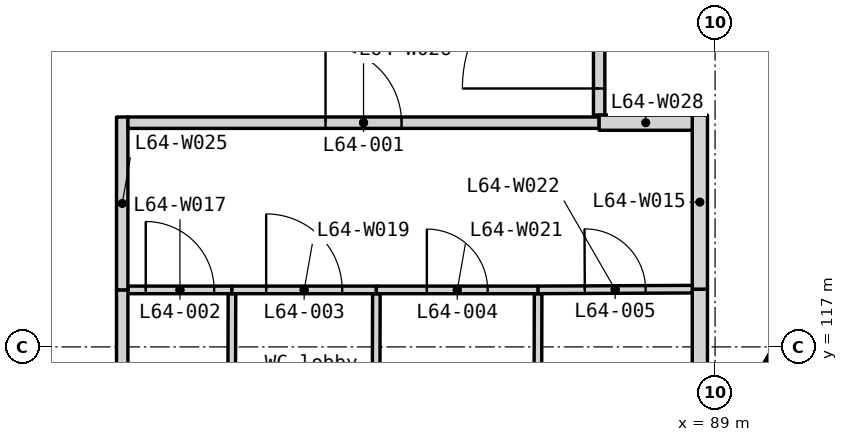
"""IFC4 building model, lengths in metres.
Left out: names, types, materials, properties, quantities, classifications, styles, units other than length and angle.
Written with IfcOpenShell. Run it as: python <this file> out.ifc"""

import sys

from ifc_helpers import new_model, si_unit, direction, frame, frame_2d, origin, place, context, subcontext, project, spatial, polyline, rectangle, outline, extrude, element, fill, save


model = new_model("IFC4")
c1 = context("Model", 3, precision=1e-05, world=origin(), true_north=direction((0.0, 1.0)))
c2 = subcontext(c1, "Body", "Model", "MODEL_VIEW")
j1 = project(units=[si_unit("LENGTHUNIT", "METRE"), si_unit("PLANEANGLEUNIT", "RADIAN")], contexts=[c1])
p1 = place(None, origin())
s1 = spatial("IfcSite", under=j1, at=p1, CompositionType="ELEMENT")
p2 = place(p1, origin())
s2 = spatial("IfcBuilding", under=s1, at=p2, CompositionType="ELEMENT")
p3 = place(p2, frame((0.0, 0.0, 262.1)))
s3 = spatial("IfcBuildingStorey", under=s2, at=p3, CompositionType="ELEMENT", Elevation=262.1)
p4 = place(p3, frame((80.905, 101.188, -0.15), z_axis=(0.0, 0.0, 1.0), x_axis=(0.500002536638, 0.866023939251, 0.0)))
e1 = element("IfcWall", 1, at=p4, inside=s3, PredefinedType="SOLIDWALL", context=c2, shape_type="SweptSolid", body=[
    extrude(outline(polyline([(36.972, 0.0), (36.972, 3.9), (0.0, 3.9), (0.0, 0.0), (36.972, 0.0)])), frame((0.0, 0.225, 0.0), z_axis=(0.0, -1.0, 0.0), x_axis=(1.0, 0.0, 0.0)), (0.0, 0.0, 1.0), 0.45),
])
p5 = place(p4, frame((0.744, 0.0, 0.95)))
e2 = element("IfcOpeningElement", 2, at=p5, cuts=e1, PredefinedType="OPENING", context=c2, shape_type="SweptSolid", body=[
    extrude(rectangle(XDim=1.2, YDim=2.2, at=frame_2d((0.6, 1.1))), frame((0.0, 0.235, 0.0), z_axis=(0.0, -1.0, 0.0), x_axis=(1.0, 0.0, 0.0)), (0.0, 0.0, 1.0), 0.47),
])
p6 = place(p4, frame((7.793, 0.0, 0.95)))
e3 = element("IfcOpeningElement", 3, at=p6, cuts=e1, PredefinedType="OPENING", context=c2, shape_type="SweptSolid", body=[
    extrude(rectangle(XDim=1.2, YDim=2.2, at=frame_2d((0.6, 1.1))), frame((0.0, 0.235, 0.0), z_axis=(0.0, -1.0, 0.0), x_axis=(1.0, 0.0, 0.0)), (0.0, 0.0, 1.0), 0.47),
])
p7 = place(p4, frame((9.493, 0.0, 0.95)))
e4 = element("IfcOpeningElement", 4, at=p7, cuts=e1, PredefinedType="OPENING", context=c2, shape_type="SweptSolid", body=[
    extrude(rectangle(XDim=1.2, YDim=2.2, at=frame_2d((0.6, 1.1))), frame((0.0, 0.235, 0.0), z_axis=(0.0, -1.0, 0.0), x_axis=(1.0, 0.0, 0.0)), (0.0, 0.0, 1.0), 0.47),
])
p8 = place(p4, frame((17.036, 0.0, 0.95)))
e5 = element("IfcOpeningElement", 5, at=p8, cuts=e1, PredefinedType="OPENING", context=c2, shape_type="SweptSolid", body=[
    extrude(rectangle(XDim=1.2, YDim=2.2, at=frame_2d((0.6, 1.1))), frame((0.0, 0.235, 0.0), z_axis=(0.0, -1.0, 0.0), x_axis=(1.0, 0.0, 0.0)), (0.0, 0.0, 1.0), 0.47),
])
p9 = place(p4, frame((18.736, 0.0, 0.95)))
e6 = element("IfcOpeningElement", 6, at=p9, cuts=e1, PredefinedType="OPENING", context=c2, shape_type="SweptSolid", body=[
    extrude(rectangle(XDim=1.2, YDim=2.2, at=frame_2d((0.6, 1.1))), frame((0.0, 0.235, 0.0), z_axis=(0.0, -1.0, 0.0), x_axis=(1.0, 0.0, 0.0)), (0.0, 0.0, 1.0), 0.47),
])
p10 = place(p4, frame((26.279, 0.0, 0.95)))
e7 = element("IfcOpeningElement", 7, at=p10, cuts=e1, PredefinedType="OPENING", context=c2, shape_type="SweptSolid", body=[
    extrude(rectangle(XDim=1.2, YDim=2.2, at=frame_2d((0.6, 1.1))), frame((0.0, 0.235, 0.0), z_axis=(0.0, -1.0, 0.0), x_axis=(1.0, 0.0, 0.0)), (0.0, 0.0, 1.0), 0.47),
])
p11 = place(p4, frame((27.979, 0.0, 0.95)))
e8 = element("IfcOpeningElement", 8, at=p11, cuts=e1, PredefinedType="OPENING", context=c2, shape_type="SweptSolid", body=[
    extrude(rectangle(XDim=1.2, YDim=2.2, at=frame_2d((0.6, 1.1))), frame((0.0, 0.235, 0.0), z_axis=(0.0, -1.0, 0.0), x_axis=(1.0, 0.0, 0.0)), (0.0, 0.0, 1.0), 0.47),
])
p12 = place(p4, frame((35.028, 0.0, 0.95)))
e9 = element("IfcOpeningElement", 9, at=p12, cuts=e1, PredefinedType="OPENING", context=c2, shape_type="SweptSolid", body=[
    extrude(rectangle(XDim=1.2, YDim=2.2, at=frame_2d((0.6, 1.1))), frame((0.0, 0.235, 0.0), z_axis=(0.0, -1.0, 0.0), x_axis=(1.0, 0.0, 0.0)), (0.0, 0.0, 1.0), 0.47),
])
p13 = place(p3, frame((88.8, 115.312, 0.0), z_axis=(0.0, 0.0, 1.0), x_axis=(0.0, 1.0, 0.0)))
e10 = element("IfcWall", 10, at=p13, inside=s3, PredefinedType="PARTITIONING", context=c2, shape_type="SweptSolid", body=[
    extrude(rectangle(XDim=2.448, YDim=0.2, at=frame_2d((1.224, 0.0))), origin(), (0.0, 0.0, 1.0), 3.062),
])
p14 = place(p3, frame((88.8, 117.76, 0.0), z_axis=(0.0, 0.0, 1.0), x_axis=(0.0, 1.0, 0.0)))
e11 = element("IfcWall", 11, at=p14, inside=s3, PredefinedType="PARTITIONING", context=c2, shape_type="SweptSolid", body=[
    extrude(rectangle(XDim=2.29, YDim=0.2, at=frame_2d((1.145, 0.0))), origin(), (0.0, 0.0, 1.0), 3.062),
])
p15 = place(p3, frame((82.634, 114.05, 0.0), z_axis=(0.0, 0.0, 1.0), x_axis=(0.002608686776, 0.999996597371, 0.0)))
e12 = element("IfcWall", 12, at=p15, inside=s3, PredefinedType="PARTITIONING", context=c2, shape_type="SweptSolid", body=[
    extrude(rectangle(XDim=3.65, YDim=0.1, at=frame_2d((1.825, 0.0))), origin(), (0.0, 0.0, 1.0), 3.75),
])
p16 = place(p3, frame((81.275, 117.75, 0.0), z_axis=(0.0, 0.0, 1.0), x_axis=(1.0, 0.0, 0.0)))
e13 = element("IfcWall", 13, at=p16, inside=s3, PredefinedType="PARTITIONING", context=c2, shape_type="SweptSolid", body=[
    extrude(rectangle(XDim=1.369, YDim=0.1, at=frame_2d((0.685, 0.0))), origin(), (0.0, 0.0, 1.0), 3.75),
])
p17 = place(p16, frame((0.235, 0.0, 0.0)))
e14 = element("IfcOpeningElement", 14, at=p17, cuts=e13, PredefinedType="OPENING", context=c2, shape_type="SweptSolid", body=[
    extrude(rectangle(XDim=0.9, YDim=2.1, at=frame_2d((0.45, 1.05))), frame((0.0, 0.06, 0.0), z_axis=(0.0, -1.0, 0.0), x_axis=(1.0, 0.0, 0.0)), (0.0, 0.0, 1.0), 0.12),
])
p18 = place(p3, frame((84.534, 114.05, 0.0), z_axis=(0.0, 0.0, 1.0), x_axis=(0.002675575707, 0.999996420641, 0.0)))
e15 = element("IfcWall", 15, at=p18, inside=s3, PredefinedType="PARTITIONING", context=c2, shape_type="SweptSolid", body=[
    extrude(rectangle(XDim=3.65, YDim=0.1, at=frame_2d((1.825, 0.0))), origin(), (0.0, 0.0, 1.0), 3.75),
])
p19 = place(p3, frame((82.644, 117.75, 0.0), z_axis=(0.0, 0.0, 1.0), x_axis=(1.0, 0.0, 0.0)))
e16 = element("IfcWall", 16, at=p19, inside=s3, PredefinedType="PARTITIONING", context=c2, shape_type="SweptSolid", body=[
    extrude(rectangle(XDim=1.9, YDim=0.1, at=frame_2d((0.95, 0.0))), origin(), (0.0, 0.0, 1.0), 3.75),
])
p20 = place(p19, frame((0.45, 0.0, 0.0)))
e17 = element("IfcOpeningElement", 17, at=p20, cuts=e16, PredefinedType="OPENING", context=c2, shape_type="SweptSolid", body=[
    extrude(rectangle(XDim=1.0, YDim=2.1, at=frame_2d((0.5, 1.05))), frame((0.0, 0.06, 0.0), z_axis=(0.0, -1.0, 0.0), x_axis=(1.0, 0.0, 0.0)), (0.0, 0.0, 1.0), 0.12),
])
p21 = place(p3, frame((86.662, 114.05, 0.0), z_axis=(0.0, 0.0, 1.0), x_axis=(0.002608686776, 0.999996597371, 0.0)))
e18 = element("IfcWall", 18, at=p21, inside=s3, PredefinedType="PARTITIONING", context=c2, shape_type="SweptSolid", body=[
    extrude(rectangle(XDim=3.65, YDim=0.1, at=frame_2d((1.825, 0.0))), origin(), (0.0, 0.0, 1.0), 3.75),
])
p22 = place(p3, frame((84.544, 117.75, 0.0), z_axis=(0.0, 0.0, 1.0), x_axis=(1.0, 0.0, 0.0)))
e19 = element("IfcWall", 19, at=p22, inside=s3, PredefinedType="PARTITIONING", context=c2, shape_type="SweptSolid", body=[
    extrude(rectangle(XDim=2.128, YDim=0.1, at=frame_2d((1.064, 0.0))), origin(), (0.0, 0.0, 1.0), 3.75),
])
p23 = place(p22, frame((0.664, 0.0, 0.0)))
e20 = element("IfcOpeningElement", 20, at=p23, cuts=e19, PredefinedType="OPENING", context=c2, shape_type="SweptSolid", body=[
    extrude(rectangle(XDim=0.8, YDim=2.1, at=frame_2d((0.4, 1.05))), frame((0.0, 0.06, 0.0), z_axis=(0.0, -1.0, 0.0), x_axis=(1.0, 0.0, 0.0)), (0.0, 0.0, 1.0), 0.12),
])
p24 = place(p3, frame((86.672, 117.75, 0.0), z_axis=(0.0, 0.0, 1.0), x_axis=(0.999988976787, 0.004695349157, 0.0)))
e21 = element("IfcWall", 21, at=p24, inside=s3, PredefinedType="PARTITIONING", context=c2, shape_type="SweptSolid", body=[
    extrude(rectangle(XDim=2.028, YDim=0.1, at=frame_2d((1.014, 0.0))), origin(), (0.0, 0.0, 1.0), 3.75),
])
p25 = place(p24, frame((0.614, 0.0, 0.0)))
e22 = element("IfcOpeningElement", 22, at=p25, cuts=e21, PredefinedType="OPENING", context=c2, shape_type="SweptSolid", body=[
    extrude(rectangle(XDim=0.8, YDim=2.1, at=frame_2d((0.4, 1.05))), frame((0.0, 0.06, 0.0), z_axis=(0.0, -1.0, 0.0), x_axis=(1.0, 0.0, 0.0)), (0.0, 0.0, 1.0), 0.12),
])
p26 = place(p3, frame((81.2, 113.95, 0.0), z_axis=(0.0, 0.0, 1.0), x_axis=(0.0, 1.0, 0.0)))
e23 = element("IfcWall", 23, at=p26, inside=s3, PredefinedType="PARTITIONING", context=c2, shape_type="SweptSolid", body=[
    extrude(rectangle(XDim=3.8, YDim=0.15, at=frame_2d((1.9, 0.0))), origin(), (0.0, 0.0, 1.0), 3.75),
])
p27 = place(p3, frame((81.2, 117.75, 0.0), z_axis=(0.0, 0.0, 1.0), x_axis=(0.0, 1.0, 0.0)))
e24 = element("IfcWall", 24, at=p27, inside=s3, PredefinedType="PARTITIONING", context=c2, shape_type="SweptSolid", body=[
    extrude(rectangle(XDim=2.275, YDim=0.15, at=frame_2d((1.137, 0.0))), origin(), (0.0, 0.0, 1.0), 3.75),
])
p28 = place(p3, frame((81.275, 119.95, 0.0), z_axis=(0.0, 0.0, 1.0), x_axis=(1.0, 0.0, 0.0)))
e25 = element("IfcWall", 25, at=p28, inside=s3, PredefinedType="PARTITIONING", context=c2, shape_type="SweptSolid", body=[
    extrude(rectangle(XDim=6.2, YDim=0.15, at=frame_2d((3.1, 0.0))), origin(), (0.0, 0.0, 1.0), 3.75),
])
p29 = place(p28, frame((2.6, 0.0, 0.0)))
e26 = element("IfcOpeningElement", 26, at=p29, cuts=e25, PredefinedType="OPENING", context=c2, shape_type="SweptSolid", body=[
    extrude(rectangle(XDim=1.0, YDim=2.1, at=frame_2d((0.5, 1.05))), frame((0.0, 0.085, 0.0), z_axis=(0.0, -1.0, 0.0), x_axis=(1.0, 0.0, 0.0)), (0.0, 0.0, 1.0), 0.17),
])
p30 = place(p3, frame((87.475, 120.05, 0.0), z_axis=(0.0, 0.0, 1.0), x_axis=(0.0, 1.0, 0.0)))
e27 = element("IfcWall", 27, at=p30, inside=s3, PredefinedType="PARTITIONING", context=c2, shape_type="SweptSolid", body=[
    extrude(rectangle(XDim=2.5, YDim=0.15, at=frame_2d((1.25, 0.0))), origin(), (0.0, 0.0, 1.0), 3.75),
])
p31 = place(p30, frame((0.35, 0.0, 0.0)))
e28 = element("IfcOpeningElement", 28, at=p31, cuts=e27, PredefinedType="OPENING", context=c2, shape_type="SweptSolid", body=[
    extrude(rectangle(XDim=1.8, YDim=2.1, at=frame_2d((0.9, 1.05))), frame((0.0, 0.085, 0.0), z_axis=(0.0, -1.0, 0.0), x_axis=(1.0, 0.0, 0.0)), (0.0, 0.0, 1.0), 0.17),
])
p32 = place(p3, frame((87.475, 119.95, 0.0), z_axis=(0.0, 0.0, 1.0), x_axis=(1.0, 0.0, 0.0)))
e29 = element("IfcWall", 29, at=p32, inside=s3, PredefinedType="PARTITIONING", context=c2, shape_type="SweptSolid", body=[
    extrude(rectangle(XDim=1.225, YDim=0.2, at=frame_2d((0.612, 0.0))), origin(), (0.0, 0.0, 1.0), 3.75),
])
p33 = place(p8, origin())
e30 = element("IfcWindow", 30, at=p33, inside=s3, PartitioningType="SINGLE_PANEL", PredefinedType="WINDOW", context=c2, shape_type="SweptSolid", body=[
    extrude(rectangle(XDim=1.2, YDim=2.2, at=frame_2d((0.6, 1.1))), frame((0.0, 0.03, 0.0), z_axis=(0.0, -1.0, 0.0), x_axis=(1.0, 0.0, 0.0)), (0.0, 0.0, 1.0), 0.06),
])
fill(e5, e30)
p34 = place(p29, origin())
e31 = element("IfcDoor", 31, at=p34, inside=s3, OperationType="SINGLE_SWING_LEFT", PredefinedType="DOOR", context=c2, shape_type="SweptSolid", body=[
    extrude(rectangle(XDim=1.0, YDim=2.1, at=frame_2d((0.5, 1.05))), frame((0.0, 0.025, 0.0), z_axis=(0.0, -1.0, 0.0), x_axis=(1.0, 0.0, 0.0)), (0.0, 0.0, 1.0), 0.05),
])
fill(e26, e31)
p35 = place(p17, origin())
e32 = element("IfcDoor", 32, at=p35, inside=s3, OperationType="SINGLE_SWING_LEFT", PredefinedType="DOOR", context=c2, shape_type="SweptSolid", body=[
    extrude(rectangle(XDim=0.9, YDim=2.1, at=frame_2d((0.45, 1.05))), frame((0.0, 0.025, 0.0), z_axis=(0.0, -1.0, 0.0), x_axis=(1.0, 0.0, 0.0)), (0.0, 0.0, 1.0), 0.05),
])
fill(e14, e32)
p36 = place(p20, origin())
e33 = element("IfcDoor", 33, at=p36, inside=s3, OperationType="SINGLE_SWING_LEFT", PredefinedType="DOOR", context=c2, shape_type="SweptSolid", body=[
    extrude(rectangle(XDim=1.0, YDim=2.1, at=frame_2d((0.5, 1.05))), frame((0.0, 0.025, 0.0), z_axis=(0.0, -1.0, 0.0), x_axis=(1.0, 0.0, 0.0)), (0.0, 0.0, 1.0), 0.05),
])
fill(e17, e33)
p37 = place(p23, origin())
e34 = element("IfcDoor", 34, at=p37, inside=s3, OperationType="SINGLE_SWING_LEFT", PredefinedType="DOOR", context=c2, shape_type="SweptSolid", body=[
    extrude(rectangle(XDim=0.8, YDim=2.1, at=frame_2d((0.4, 1.05))), frame((0.0, 0.025, 0.0), z_axis=(0.0, -1.0, 0.0), x_axis=(1.0, 0.0, 0.0)), (0.0, 0.0, 1.0), 0.05),
])
fill(e20, e34)
p38 = place(p25, origin())
e35 = element("IfcDoor", 35, at=p38, inside=s3, OperationType="SINGLE_SWING_LEFT", PredefinedType="DOOR", context=c2, shape_type="SweptSolid", body=[
    extrude(rectangle(XDim=0.8, YDim=2.1, at=frame_2d((0.4, 1.05))), frame((0.0, 0.025, 0.0), z_axis=(0.0, -1.0, 0.0), x_axis=(1.0, 0.0, 0.0)), (0.0, 0.0, 1.0), 0.05),
])
fill(e22, e35)
p39 = place(p31, origin())
e36 = element("IfcDoor", 36, at=p39, inside=s3, OperationType="SINGLE_SWING_LEFT", PredefinedType="DOOR", context=c2, shape_type="SweptSolid", body=[
    extrude(rectangle(XDim=1.8, YDim=2.1, at=frame_2d((0.9, 1.05))), frame((0.0, 0.025, 0.0), z_axis=(0.0, -1.0, 0.0), x_axis=(1.0, 0.0, 0.0)), (0.0, 0.0, 1.0), 0.05),
])
fill(e28, e36)
save(model, sys.argv[1])
